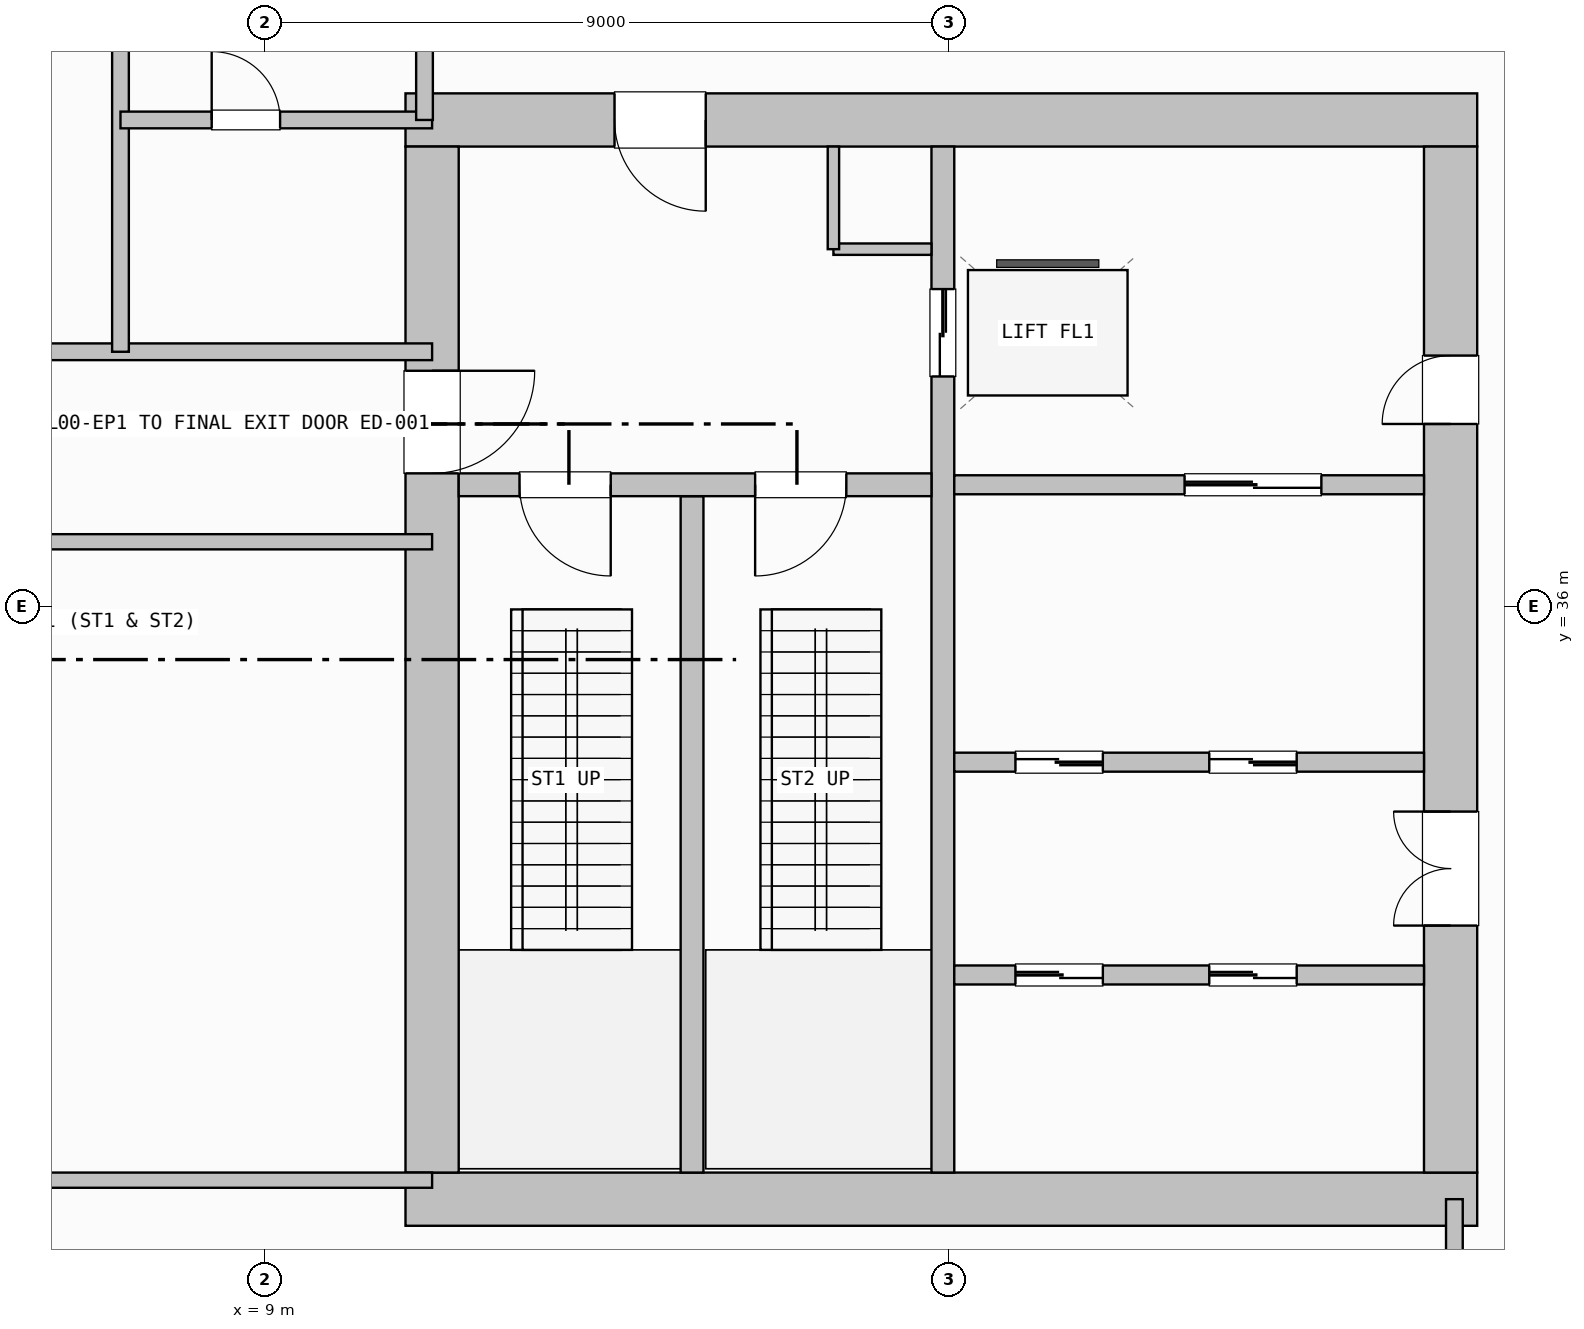
"""IFC4 building model, lengths in metres.
Left out: names, types, materials, properties, quantities, classifications, styles, units other than length and angle.
Written with IfcOpenShell. Run it as: python <this file> out.ifc"""

import sys

from ifc_helpers import new_model, si_unit, direction, frame, frame_2d, origin, origin_2d, place, context, subcontext, project, spatial, rectangle, i_section, extrude, element, fill, save


model = new_model("IFC4")
c1 = context("Model", 3, precision=1e-05, world=origin(), true_north=direction((0.0, 1.0)))
c2 = subcontext(c1, "Body", "Model", "MODEL_VIEW")
j1 = project(units=[si_unit("LENGTHUNIT", "METRE"), si_unit("PLANEANGLEUNIT", "RADIAN")], contexts=[c1])
p1 = place(None, origin())
s1 = spatial("IfcSite", under=j1, at=p1, CompositionType="ELEMENT")
p2 = place(p1, origin())
s2 = spatial("IfcBuilding", under=s1, at=p2, CompositionType="ELEMENT")
p3 = place(p2, origin())
s3 = spatial("IfcBuildingStorey", under=s2, at=p3, CompositionType="ELEMENT", Elevation=0.0)
p4 = place(p3, frame((9.0, 36.0, 0.0), z_axis=(0.0, 0.0, 1.0), x_axis=(1.0, 0.0, 0.0)))
e1 = element("IfcColumn", 1, at=p4, inside=s3, PredefinedType="COLUMN", context=c2, shape_type="SweptSolid", body=[
    extrude(i_section(OverallWidth=0.454, OverallDepth=0.569, WebThickness=0.078, FlangeThickness=0.125, FilletRadius=0.015, at=origin_2d()), origin(), (0.0, 0.0, 1.0), 5.8),
])
p5 = place(p3, frame((24.95, 28.2, 0.0), z_axis=(0.0, 0.0, 1.0), x_axis=(-1.0, 0.0, 0.0)))
e2 = element("IfcWall", 2, at=p5, inside=s3, PredefinedType="SHEAR", context=c2, shape_type="SweptSolid", body=[
    extrude(rectangle(XDim=14.1, YDim=0.7, at=frame_2d((7.05, 0.0))), origin(), (0.0, 0.0, 1.0), 5.48),
])
p6 = place(p3, frame((24.95, 42.4, 0.0), z_axis=(0.0, 0.0, 1.0), x_axis=(-1.0, 0.0, 0.0)))
e3 = element("IfcWall", 3, at=p6, inside=s3, PredefinedType="SHEAR", context=c2, shape_type="SweptSolid", body=[
    extrude(rectangle(XDim=14.1, YDim=0.7, at=frame_2d((7.05, 0.0))), origin(), (0.0, 0.0, 1.0), 5.48),
])
p7 = place(p6, frame((10.15, 0.0, 0.0)))
e4 = element("IfcOpeningElement", 4, at=p7, cuts=e3, PredefinedType="OPENING", context=c2, shape_type="SweptSolid", body=[
    extrude(rectangle(XDim=1.2, YDim=2.15, at=frame_2d((0.6, 1.075))), frame((0.0, 0.36, 0.0), z_axis=(0.0, -1.0, 0.0), x_axis=(1.0, 0.0, 0.0)), (0.0, 0.0, 1.0), 0.72),
])
p8 = place(p3, frame((11.2, 42.05, 0.0), z_axis=(0.0, 0.0, 1.0), x_axis=(0.0, -1.0, 0.0)))
e5 = element("IfcWall", 5, at=p8, inside=s3, PredefinedType="SHEAR", context=c2, shape_type="SweptSolid", body=[
    extrude(rectangle(XDim=13.5, YDim=0.7, at=frame_2d((6.75, 0.0))), origin(), (0.0, 0.0, 1.0), 5.48),
])
p9 = place(p8, frame((2.95, 0.0, 0.0)))
e6 = element("IfcOpeningElement", 6, at=p9, cuts=e5, PredefinedType="OPENING", context=c2, shape_type="SweptSolid", body=[
    extrude(rectangle(XDim=1.35, YDim=2.15, at=frame_2d((0.675, 1.075))), frame((0.0, 0.36, 0.0), z_axis=(0.0, -1.0, 0.0), x_axis=(1.0, 0.0, 0.0)), (0.0, 0.0, 1.0), 0.72),
])
p10 = place(p3, frame((24.6, 28.55, 0.0), z_axis=(0.0, 0.0, 1.0), x_axis=(0.0, 1.0, 0.0)))
e7 = element("IfcWall", 7, at=p10, inside=s3, PredefinedType="SHEAR", context=c2, shape_type="SweptSolid", body=[
    extrude(rectangle(XDim=13.5, YDim=0.7, at=frame_2d((6.75, 0.0))), origin(), (0.0, 0.0, 1.0), 5.48),
])
p11 = place(p10, frame((3.25, 0.0, 0.0)))
e8 = element("IfcOpeningElement", 8, at=p11, cuts=e7, PredefinedType="OPENING", context=c2, shape_type="SweptSolid", body=[
    extrude(rectangle(XDim=1.5, YDim=2.2, at=frame_2d((0.75, 1.1))), frame((0.0, 0.36, 0.0), z_axis=(0.0, -1.0, 0.0), x_axis=(1.0, 0.0, 0.0)), (0.0, 0.0, 1.0), 0.72),
])
p12 = place(p10, frame((9.85, 0.0, 0.0)))
e9 = element("IfcOpeningElement", 9, at=p12, cuts=e7, PredefinedType="OPENING", context=c2, shape_type="SweptSolid", body=[
    extrude(rectangle(XDim=0.9, YDim=2.1, at=frame_2d((0.45, 1.05))), frame((0.0, 0.36, 0.0), z_axis=(0.0, -1.0, 0.0), x_axis=(1.0, 0.0, 0.0)), (0.0, 0.0, 1.0), 0.72),
])
p13 = place(p3, frame((14.62, 28.55, 0.0), z_axis=(0.0, 0.0, 1.0), x_axis=(0.0, 1.0, 0.0)))
e10 = element("IfcWall", 10, at=p13, inside=s3, PredefinedType="SHEAR", context=c2, shape_type="SweptSolid", body=[
    extrude(rectangle(XDim=8.9, YDim=0.3, at=frame_2d((4.45, 0.0))), origin(), (0.0, 0.0, 1.0), 5.48),
])
p14 = place(p3, frame((17.92, 42.05, 0.0), z_axis=(0.0, 0.0, 1.0), x_axis=(0.0, -1.0, 0.0)))
e11 = element("IfcWall", 11, at=p14, inside=s3, PredefinedType="SHEAR", context=c2, shape_type="SweptSolid", body=[
    extrude(rectangle(XDim=13.5, YDim=0.3, at=frame_2d((6.75, 0.0))), origin(), (0.0, 0.0, 1.0), 5.48),
])
p15 = place(p14, frame((1.875, 0.0, 0.0)))
e12 = element("IfcOpeningElement", 12, at=p15, cuts=e11, PredefinedType="OPENING", context=c2, shape_type="SweptSolid", body=[
    extrude(rectangle(XDim=1.15, YDim=2.15, at=frame_2d((0.575, 1.075))), frame((0.0, 0.16, 0.0), z_axis=(0.0, -1.0, 0.0), x_axis=(1.0, 0.0, 0.0)), (0.0, 0.0, 1.0), 0.32),
])
p16 = place(p3, frame((17.77, 37.6, 0.0), z_axis=(0.0, 0.0, 1.0), x_axis=(-1.0, 0.0, 0.0)))
e13 = element("IfcWall", 13, at=p16, inside=s3, PredefinedType="SHEAR", context=c2, shape_type="SweptSolid", body=[
    extrude(rectangle(XDim=6.22, YDim=0.3, at=frame_2d((3.11, 0.0))), origin(), (0.0, 0.0, 1.0), 5.48),
])
p17 = place(p16, frame((4.22, 0.0, 0.0)))
e14 = element("IfcOpeningElement", 14, at=p17, cuts=e13, PredefinedType="OPENING", context=c2, shape_type="SweptSolid", body=[
    extrude(rectangle(XDim=1.2, YDim=2.15, at=frame_2d((0.6, 1.075))), frame((0.0, 0.16, 0.0), z_axis=(0.0, -1.0, 0.0), x_axis=(1.0, 0.0, 0.0)), (0.0, 0.0, 1.0), 0.32),
])
p18 = place(p16, frame((1.12, 0.0, 0.0)))
e15 = element("IfcOpeningElement", 15, at=p18, cuts=e13, PredefinedType="OPENING", context=c2, shape_type="SweptSolid", body=[
    extrude(rectangle(XDim=1.2, YDim=2.15, at=frame_2d((0.6, 1.075))), frame((0.0, 0.16, 0.0), z_axis=(0.0, -1.0, 0.0), x_axis=(1.0, 0.0, 0.0)), (0.0, 0.0, 1.0), 0.32),
])
p19 = place(p3, frame((16.48, 40.7, 0.0), z_axis=(0.0, 0.0, 1.0), x_axis=(1.0, 0.0, 0.0)))
e16 = element("IfcWall", 16, at=p19, inside=s3, PredefinedType="PARTITIONING", context=c2, shape_type="SweptSolid", body=[
    extrude(rectangle(XDim=1.29, YDim=0.15, at=frame_2d((0.645, 0.0))), origin(), (0.0, 0.0, 1.0), 5.48),
])
p20 = place(p3, frame((16.48, 40.7, 0.0), z_axis=(0.0, 0.0, 1.0), x_axis=(0.0, 1.0, 0.0)))
e17 = element("IfcWall", 17, at=p20, inside=s3, PredefinedType="PARTITIONING", context=c2, shape_type="SweptSolid", body=[
    extrude(rectangle(XDim=1.35, YDim=0.15, at=frame_2d((0.675, 0.0))), origin(), (0.0, 0.0, 1.0), 5.48),
])
p21 = place(p3, frame((18.07, 37.6, 0.0), z_axis=(0.0, 0.0, 1.0), x_axis=(1.0, 0.0, 0.0)))
e18 = element("IfcWall", 18, at=p21, inside=s3, PredefinedType="PARTITIONING", context=c2, shape_type="SweptSolid", body=[
    extrude(rectangle(XDim=6.18, YDim=0.25, at=frame_2d((3.09, 0.0))), origin(), (0.0, 0.0, 1.0), 5.48),
])
p22 = place(p21, frame((3.03, 0.0, 0.0)))
e19 = element("IfcOpeningElement", 19, at=p22, cuts=e18, PredefinedType="OPENING", context=c2, shape_type="SweptSolid", body=[
    extrude(rectangle(XDim=1.8, YDim=2.3, at=frame_2d((0.9, 1.15))), frame((0.0, 0.135, 0.0), z_axis=(0.0, -1.0, 0.0), x_axis=(1.0, 0.0, 0.0)), (0.0, 0.0, 1.0), 0.27),
])
p23 = place(p3, frame((18.07, 31.15, 0.0), z_axis=(0.0, 0.0, 1.0), x_axis=(1.0, 0.0, 0.0)))
e20 = element("IfcWall", 20, at=p23, inside=s3, PredefinedType="PARTITIONING", context=c2, shape_type="SweptSolid", body=[
    extrude(rectangle(XDim=6.18, YDim=0.25, at=frame_2d((3.09, 0.0))), origin(), (0.0, 0.0, 1.0), 5.48),
])
p24 = place(p23, frame((0.805, 0.0, 0.0)))
e21 = element("IfcOpeningElement", 21, at=p24, cuts=e20, PredefinedType="OPENING", context=c2, shape_type="SweptSolid", body=[
    extrude(rectangle(XDim=1.15, YDim=2.15, at=frame_2d((0.575, 1.075))), frame((0.0, 0.135, 0.0), z_axis=(0.0, -1.0, 0.0), x_axis=(1.0, 0.0, 0.0)), (0.0, 0.0, 1.0), 0.27),
])
p25 = place(p23, frame((3.355, 0.0, 0.0)))
e22 = element("IfcOpeningElement", 22, at=p25, cuts=e20, PredefinedType="OPENING", context=c2, shape_type="SweptSolid", body=[
    extrude(rectangle(XDim=1.15, YDim=2.15, at=frame_2d((0.575, 1.075))), frame((0.0, 0.135, 0.0), z_axis=(0.0, -1.0, 0.0), x_axis=(1.0, 0.0, 0.0)), (0.0, 0.0, 1.0), 0.27),
])
p26 = place(p3, frame((24.25, 33.95, 0.0), z_axis=(0.0, 0.0, 1.0), x_axis=(-1.0, 0.0, 0.0)))
e23 = element("IfcWall", 23, at=p26, inside=s3, PredefinedType="PARTITIONING", context=c2, shape_type="SweptSolid", body=[
    extrude(rectangle(XDim=6.18, YDim=0.25, at=frame_2d((3.09, 0.0))), origin(), (0.0, 0.0, 1.0), 5.48),
])
p27 = place(p26, frame((4.225, 0.0, 0.0)))
e24 = element("IfcOpeningElement", 24, at=p27, cuts=e23, PredefinedType="OPENING", context=c2, shape_type="SweptSolid", body=[
    extrude(rectangle(XDim=1.15, YDim=2.15, at=frame_2d((0.575, 1.075))), frame((0.0, 0.135, 0.0), z_axis=(0.0, -1.0, 0.0), x_axis=(1.0, 0.0, 0.0)), (0.0, 0.0, 1.0), 0.27),
])
p28 = place(p26, frame((1.675, 0.0, 0.0)))
e25 = element("IfcOpeningElement", 25, at=p28, cuts=e23, PredefinedType="OPENING", context=c2, shape_type="SweptSolid", body=[
    extrude(rectangle(XDim=1.15, YDim=2.15, at=frame_2d((0.575, 1.075))), frame((0.0, 0.135, 0.0), z_axis=(0.0, -1.0, 0.0), x_axis=(1.0, 0.0, 0.0)), (0.0, 0.0, 1.0), 0.27),
])
p29 = place(p3, frame((0.0, 28.45, 0.0), z_axis=(0.0, 0.0, 1.0), x_axis=(1.0, 0.0, 0.0)))
e26 = element("IfcWall", 26, at=p29, inside=s3, PredefinedType="PARTITIONING", context=c2, shape_type="SweptSolid", body=[
    extrude(rectangle(XDim=11.2, YDim=0.2, at=frame_2d((5.6, 0.0))), origin(), (0.0, 0.0, 1.0), 4.605),
])
p30 = place(p29, frame((2.5, 0.0, 0.0)))
e27 = element("IfcOpeningElement", 27, at=p30, cuts=e26, PredefinedType="OPENING", context=c2, shape_type="SweptSolid", body=[
    extrude(rectangle(XDim=1.0, YDim=2.15, at=frame_2d((0.5, 1.075))), frame((0.0, 0.11, 0.0), z_axis=(0.0, -1.0, 0.0), x_axis=(1.0, 0.0, 0.0)), (0.0, 0.0, 1.0), 0.22),
])
p31 = place(p3, frame((0.0, 36.85, 0.0), z_axis=(0.0, 0.0, 1.0), x_axis=(1.0, 0.0, 0.0)))
e28 = element("IfcWall", 28, at=p31, inside=s3, PredefinedType="PARTITIONING", context=c2, shape_type="SweptSolid", body=[
    extrude(rectangle(XDim=11.2, YDim=0.2, at=frame_2d((5.6, 0.0))), origin(), (0.0, 0.0, 1.0), 4.605),
])
p32 = place(p3, frame((0.0, 39.35, 0.0), z_axis=(0.0, 0.0, 1.0), x_axis=(1.0, 0.0, 0.0)))
e29 = element("IfcWall", 29, at=p32, inside=s3, PredefinedType="PARTITIONING", context=c2, shape_type="SweptSolid", body=[
    extrude(rectangle(XDim=11.2, YDim=0.22, at=frame_2d((5.6, 0.0))), origin(), (0.0, 0.0, 1.0), 4.605),
])
p33 = place(p3, frame((7.1, 39.35, 0.0), z_axis=(0.0, 0.0, 1.0), x_axis=(0.0, 1.0, 0.0)))
e30 = element("IfcWall", 30, at=p33, inside=s3, PredefinedType="PARTITIONING", context=c2, shape_type="SweptSolid", body=[
    extrude(rectangle(XDim=8.55, YDim=0.22, at=frame_2d((4.275, 0.0))), origin(), (0.0, 0.0, 1.0), 4.533),
])
p34 = place(p33, frame((5.2, 0.0, 0.0)))
e31 = element("IfcOpeningElement", 31, at=p34, cuts=e30, PredefinedType="OPENING", context=c2, shape_type="SweptSolid", body=[
    extrude(rectangle(XDim=1.0, YDim=2.15, at=frame_2d((0.5, 1.075))), frame((0.0, 0.12, 0.0), z_axis=(0.0, -1.0, 0.0), x_axis=(1.0, 0.0, 0.0)), (0.0, 0.0, 1.0), 0.24),
])
p35 = place(p3, frame((7.1, 42.4, 0.0), z_axis=(0.0, 0.0, 1.0), x_axis=(1.0, 0.0, 0.0)))
e32 = element("IfcWall", 32, at=p35, inside=s3, PredefinedType="PARTITIONING", context=c2, shape_type="SweptSolid", body=[
    extrude(rectangle(XDim=4.1, YDim=0.22, at=frame_2d((2.05, 0.0))), origin(), (0.0, 0.0, 1.0), 4.605),
])
p36 = place(p35, frame((1.2, 0.0, 0.0)))
e33 = element("IfcOpeningElement", 33, at=p36, cuts=e32, PredefinedType="OPENING", context=c2, shape_type="SweptSolid", body=[
    extrude(rectangle(XDim=0.9, YDim=2.1, at=frame_2d((0.45, 1.05))), frame((0.0, 0.12, 0.0), z_axis=(0.0, -1.0, 0.0), x_axis=(1.0, 0.0, 0.0)), (0.0, 0.0, 1.0), 0.24),
])
p37 = place(p3, frame((11.1, 42.4, 0.0), z_axis=(0.0, 0.0, 1.0), x_axis=(0.0, 1.0, 0.0)))
e34 = element("IfcWall", 34, at=p37, inside=s3, PredefinedType="PARTITIONING", context=c2, shape_type="SweptSolid", body=[
    extrude(rectangle(XDim=5.5, YDim=0.22, at=frame_2d((2.75, 0.0))), origin(), (0.0, 0.0, 1.0), 4.533),
])
p38 = place(p37, frame((1.8, 0.0, 0.0)))
e35 = element("IfcOpeningElement", 35, at=p38, cuts=e34, PredefinedType="OPENING", context=c2, shape_type="SweptSolid", body=[
    extrude(rectangle(XDim=0.9, YDim=2.1, at=frame_2d((0.45, 1.05))), frame((0.0, 0.12, 0.0), z_axis=(0.0, -1.0, 0.0), x_axis=(1.0, 0.0, 0.0)), (0.0, 0.0, 1.0), 0.24),
])
p39 = place(p3, frame((24.65, 9.05, 0.0), z_axis=(0.0, 0.0, 1.0), x_axis=(0.0, 1.0, 0.0)))
e36 = element("IfcWall", 36, at=p39, inside=s3, PredefinedType="PARTITIONING", context=c2, shape_type="SweptSolid", body=[
    extrude(rectangle(XDim=19.15, YDim=0.22, at=frame_2d((9.575, 0.0))), origin(), (0.0, 0.0, 1.0), 4.512),
])
p40 = place(p9, origin())
e37 = element("IfcDoor", 37, at=p40, inside=s3, OperationType="SINGLE_SWING_LEFT", PredefinedType="DOOR", context=c2, shape_type="SweptSolid", body=[
    extrude(rectangle(XDim=1.35, YDim=2.15, at=frame_2d((0.675, 1.075))), frame((0.0, 0.025, 0.0), z_axis=(0.0, -1.0, 0.0), x_axis=(1.0, 0.0, 0.0)), (0.0, 0.0, 1.0), 0.05),
])
fill(e6, e37)
p41 = place(p17, origin())
e38 = element("IfcDoor", 38, at=p41, inside=s3, OperationType="SINGLE_SWING_LEFT", PredefinedType="DOOR", context=c2, shape_type="SweptSolid", body=[
    extrude(rectangle(XDim=1.2, YDim=2.15, at=frame_2d((0.6, 1.075))), frame((0.0, 0.025, 0.0), z_axis=(0.0, -1.0, 0.0), x_axis=(1.0, 0.0, 0.0)), (0.0, 0.0, 1.0), 0.05),
])
fill(e14, e38)
p42 = place(p18, origin())
e39 = element("IfcDoor", 39, at=p42, inside=s3, OperationType="SINGLE_SWING_RIGHT", PredefinedType="DOOR", context=c2, shape_type="SweptSolid", body=[
    extrude(rectangle(XDim=1.2, YDim=2.15, at=frame_2d((0.6, 1.075))), frame((0.0, 0.025, 0.0), z_axis=(0.0, -1.0, 0.0), x_axis=(1.0, 0.0, 0.0)), (0.0, 0.0, 1.0), 0.05),
])
fill(e15, e39)
p43 = place(p11, origin())
e40 = element("IfcDoor", 40, at=p43, inside=s3, OperationType="DOUBLE_DOOR_SINGLE_SWING", PredefinedType="DOOR", context=c2, shape_type="SweptSolid", body=[
    extrude(rectangle(XDim=1.5, YDim=2.2, at=frame_2d((0.75, 1.1))), frame((0.0, 0.025, 0.0), z_axis=(0.0, -1.0, 0.0), x_axis=(1.0, 0.0, 0.0)), (0.0, 0.0, 1.0), 0.05),
])
fill(e8, e40)
p44 = place(p7, origin())
e41 = element("IfcDoor", 41, at=p44, inside=s3, OperationType="SINGLE_SWING_LEFT", PredefinedType="DOOR", context=c2, shape_type="SweptSolid", body=[
    extrude(rectangle(XDim=1.2, YDim=2.15, at=frame_2d((0.6, 1.075))), frame((0.0, 0.025, 0.0), z_axis=(0.0, -1.0, 0.0), x_axis=(1.0, 0.0, 0.0)), (0.0, 0.0, 1.0), 0.05),
])
fill(e4, e41)
p45 = place(p12, origin())
e42 = element("IfcDoor", 42, at=p45, inside=s3, OperationType="SINGLE_SWING_LEFT", PredefinedType="DOOR", context=c2, shape_type="SweptSolid", body=[
    extrude(rectangle(XDim=0.9, YDim=2.1, at=frame_2d((0.45, 1.05))), frame((0.0, 0.025, 0.0), z_axis=(0.0, -1.0, 0.0), x_axis=(1.0, 0.0, 0.0)), (0.0, 0.0, 1.0), 0.05),
])
fill(e9, e42)
p46 = place(p15, origin())
e43 = element("IfcDoor", 43, at=p46, inside=s3, OperationType="DOUBLE_DOOR_SLIDING", PredefinedType="DOOR", context=c2, shape_type="SweptSolid", body=[
    extrude(rectangle(XDim=1.15, YDim=2.15, at=frame_2d((0.575, 1.075))), frame((0.0, 0.025, 0.0), z_axis=(0.0, -1.0, 0.0), x_axis=(1.0, 0.0, 0.0)), (0.0, 0.0, 1.0), 0.05),
])
fill(e12, e43)
p47 = place(p22, origin())
e44 = element("IfcDoor", 44, at=p47, inside=s3, OperationType="DOUBLE_DOOR_SLIDING", PredefinedType="DOOR", context=c2, shape_type="SweptSolid", body=[
    extrude(rectangle(XDim=1.8, YDim=2.3, at=frame_2d((0.9, 1.15))), frame((0.0, 0.025, 0.0), z_axis=(0.0, -1.0, 0.0), x_axis=(1.0, 0.0, 0.0)), (0.0, 0.0, 1.0), 0.05),
])
fill(e19, e44)
p48 = place(p24, origin())
e45 = element("IfcDoor", 45, at=p48, inside=s3, OperationType="DOUBLE_DOOR_SLIDING", PredefinedType="DOOR", context=c2, shape_type="SweptSolid", body=[
    extrude(rectangle(XDim=1.15, YDim=2.15, at=frame_2d((0.575, 1.075))), frame((0.0, 0.025, 0.0), z_axis=(0.0, -1.0, 0.0), x_axis=(1.0, 0.0, 0.0)), (0.0, 0.0, 1.0), 0.05),
])
fill(e21, e45)
p49 = place(p25, origin())
e46 = element("IfcDoor", 46, at=p49, inside=s3, OperationType="DOUBLE_DOOR_SLIDING", PredefinedType="DOOR", context=c2, shape_type="SweptSolid", body=[
    extrude(rectangle(XDim=1.15, YDim=2.15, at=frame_2d((0.575, 1.075))), frame((0.0, 0.025, 0.0), z_axis=(0.0, -1.0, 0.0), x_axis=(1.0, 0.0, 0.0)), (0.0, 0.0, 1.0), 0.05),
])
fill(e22, e46)
p50 = place(p27, origin())
e47 = element("IfcDoor", 47, at=p50, inside=s3, OperationType="DOUBLE_DOOR_SLIDING", PredefinedType="DOOR", context=c2, shape_type="SweptSolid", body=[
    extrude(rectangle(XDim=1.15, YDim=2.15, at=frame_2d((0.575, 1.075))), frame((0.0, 0.025, 0.0), z_axis=(0.0, -1.0, 0.0), x_axis=(1.0, 0.0, 0.0)), (0.0, 0.0, 1.0), 0.05),
])
fill(e24, e47)
p51 = place(p28, origin())
e48 = element("IfcDoor", 48, at=p51, inside=s3, OperationType="DOUBLE_DOOR_SLIDING", PredefinedType="DOOR", context=c2, shape_type="SweptSolid", body=[
    extrude(rectangle(XDim=1.15, YDim=2.15, at=frame_2d((0.575, 1.075))), frame((0.0, 0.025, 0.0), z_axis=(0.0, -1.0, 0.0), x_axis=(1.0, 0.0, 0.0)), (0.0, 0.0, 1.0), 0.05),
])
fill(e25, e48)
p52 = place(p36, origin())
e49 = element("IfcDoor", 49, at=p52, inside=s3, OperationType="SINGLE_SWING_LEFT", PredefinedType="DOOR", context=c2, shape_type="SweptSolid", body=[
    extrude(rectangle(XDim=0.9, YDim=2.1, at=frame_2d((0.45, 1.05))), frame((0.0, 0.025, 0.0), z_axis=(0.0, -1.0, 0.0), x_axis=(1.0, 0.0, 0.0)), (0.0, 0.0, 1.0), 0.05),
])
fill(e33, e49)
save(model, sys.argv[1])
